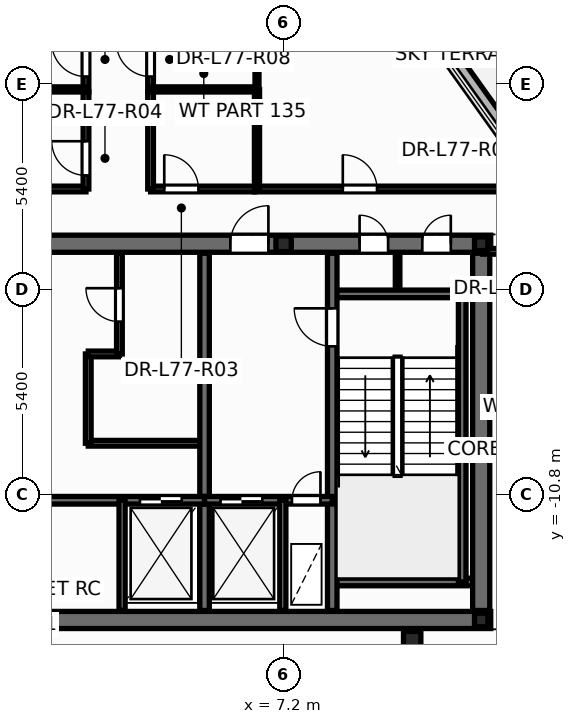
"""IFC4 building model, lengths in metres.
Left out: names, types, materials, properties, quantities, classifications, styles, units other than length and angle.
Written with IfcOpenShell. Run it as: python <this file> out.ifc"""

import sys

from ifc_helpers import new_model, si_unit, direction, frame, frame_2d, origin, origin_2d, place, context, subcontext, project, spatial, rectangle, hollow_circle, i_section, extrude, element, fill, save


model = new_model("IFC4")
c1 = context("Model", 3, precision=1e-05, world=origin(), true_north=direction((0.0, 1.0)))
c2 = subcontext(c1, "Body", "Model", "MODEL_VIEW")
j1 = project(units=[si_unit("LENGTHUNIT", "METRE"), si_unit("PLANEANGLEUNIT", "RADIAN")], contexts=[c1])
p1 = place(None, origin())
s1 = spatial("IfcSite", under=j1, at=p1, CompositionType="ELEMENT")
p2 = place(p1, origin())
s2 = spatial("IfcBuilding", under=s1, at=p2, CompositionType="ELEMENT")
p3 = place(p2, frame((0.0, 0.0, 293.4)))
s3 = spatial("IfcBuildingStorey", under=s2, at=p3, CompositionType="ELEMENT", Elevation=293.4)
p4 = place(p3, frame((10.583, -14.63, 0.0), z_axis=(0.0, 0.0, 1.0), x_axis=(1.0, 0.0, 0.0)))
e1 = element("IfcColumn", 1, at=p4, inside=s3, PredefinedType="COLUMN", context=c2, shape_type="SweptSolid", body=[
    extrude(hollow_circle(Radius=0.229, WallThickness=0.016, at=origin_2d()), origin(), (0.0, 0.0, 1.0), 4.2),
])
for number, where, z_axis, x_axis in (
    (2, (12.4, -14.1, 0.0), (0.0, 0.0, 1.0), (1.0, 0.0, 0.0)),
    (3, (12.4, -4.2, 0.0), (0.0, 0.0, 1.0), (1.0, 0.0, 0.0)),
):
    element("IfcColumn", number, at=place(p3, frame(where, z_axis=z_axis, x_axis=x_axis)), inside=s3, PredefinedType="COLUMN", context=c2, shape_type="SweptSolid", body=[
        extrude(i_section(OverallWidth=0.352, OverallDepth=0.359, WebThickness=0.018, FlangeThickness=0.026, at=origin_2d()), origin(), (0.0, 0.0, 1.0), 4.2),
    ])
p5 = place(p3, frame((7.2, -4.2, 0.0), z_axis=(0.0, 0.0, 1.0), x_axis=(1.0, 0.0, 0.0)))
e4 = element("IfcColumn", 4, at=p5, inside=s3, PredefinedType="PILASTER", context=c2, shape_type="SweptSolid", body=[
    extrude(i_section(OverallWidth=0.405, OverallDepth=0.414, WebThickness=0.022, FlangeThickness=0.032, at=origin_2d()), origin(), (0.0, 0.0, 1.0), 4.2),
])
p6 = place(p3, frame((15.285, -4.406, -0.2), z_axis=(0.0, 0.0, 1.0), x_axis=(-0.580762496963, 0.814073044709, 0.0)))
e5 = element("IfcWall", 5, at=p6, inside=s3, PredefinedType="PARAPET", context=c2, shape_type="SweptSolid", body=[
    extrude(rectangle(XDim=23.163, YDim=0.36, at=frame_2d((11.581, 0.0))), origin(), (0.0, 0.0, 1.0), 0.38),
])
p7 = place(p3, frame((2.06, -9.45, 0.0), z_axis=(0.0, 0.0, 1.0), x_axis=(1.0, 0.0, 0.0)))
e6 = element("IfcWall", 6, at=p7, inside=s3, PredefinedType="PARTITIONING", context=c2, shape_type="SweptSolid", body=[
    extrude(rectangle(XDim=3.06, YDim=0.15, at=frame_2d((1.53, 0.0))), origin(), (0.0, 0.0, 1.0), 3.88),
])
p8 = place(p3, frame((2.06, -9.45, 0.0), z_axis=(0.0, 0.0, 1.0), x_axis=(0.0, 1.0, 0.0)))
e7 = element("IfcWall", 7, at=p8, inside=s3, PredefinedType="PARTITIONING", context=c2, shape_type="SweptSolid", body=[
    extrude(rectangle(XDim=2.35, YDim=0.15, at=frame_2d((1.175, 0.0))), origin(), (0.0, 0.0, 1.0), 3.88),
])
p9 = place(p3, frame((2.06, -7.1, 0.0), z_axis=(0.0, 0.0, 1.0), x_axis=(1.0, 0.0, 0.0)))
e8 = element("IfcWall", 8, at=p9, inside=s3, PredefinedType="PARTITIONING", context=c2, shape_type="SweptSolid", body=[
    extrude(rectangle(XDim=0.82, YDim=0.15, at=frame_2d((0.41, 0.0))), origin(), (0.0, 0.0, 1.0), 3.88),
])
p10 = place(p3, frame((2.88, -7.1, 0.0), z_axis=(0.0, 0.0, 1.0), x_axis=(0.0, 1.0, 0.0)))
e9 = element("IfcWall", 9, at=p10, inside=s3, PredefinedType="PARTITIONING", context=c2, shape_type="SweptSolid", body=[
    extrude(rectangle(XDim=2.65, YDim=0.15, at=frame_2d((1.325, 0.0))), origin(), (0.0, 0.0, 1.0), 3.88),
])
p11 = place(p10, frame((0.85, 0.0, 0.0)))
e10 = element("IfcOpeningElement", 10, at=p11, cuts=e9, PredefinedType="OPENING", context=c2, shape_type="SweptSolid", body=[
    extrude(rectangle(XDim=0.886, YDim=2.104, at=frame_2d((0.44, 1.052))), frame((0.0, 0.085, 0.0), z_axis=(0.0, -1.0, 0.0), x_axis=(1.0, 0.0, 0.0)), (0.0, 0.0, 1.0), 0.17),
])
p12 = place(p3, frame((10.2, -5.52, 0.0), z_axis=(0.0, 0.0, 1.0), x_axis=(0.0, 1.0, 0.0)))
e11 = element("IfcWall", 11, at=p12, inside=s3, PredefinedType="PARTITIONING", context=c2, shape_type="SweptSolid", body=[
    extrude(rectangle(XDim=1.12, YDim=0.12, at=frame_2d((0.56, 0.0))), origin(), (0.0, 0.0, 1.0), 3.88),
])
p13 = place(p3, frame((-12.65, -14.1, 0.0), z_axis=(0.0, 0.0, 1.0), x_axis=(1.0, 0.0, 0.0)))
e12 = element("IfcWall", 12, at=p13, inside=s3, PredefinedType="SHEAR", context=c2, shape_type="SweptSolid", body=[
    extrude(rectangle(XDim=25.3, YDim=0.45, at=frame_2d((12.65, 0.0))), origin(), (0.0, 0.0, 1.0), 4.2),
])
p14 = place(p3, frame((-12.65, -4.2, 0.0), z_axis=(0.0, 0.0, 1.0), x_axis=(1.0, 0.0, 0.0)))
e13 = element("IfcWall", 13, at=p14, inside=s3, PredefinedType="SHEAR", context=c2, shape_type="SweptSolid", body=[
    extrude(rectangle(XDim=25.3, YDim=0.45, at=frame_2d((12.65, 0.0))), origin(), (0.0, 0.0, 1.0), 4.2),
])
p15 = place(p14, frame((0.95, 0.0, 0.0)))
e14 = element("IfcOpeningElement", 14, at=p15, cuts=e13, PredefinedType="OPENING", context=c2, shape_type="SweptSolid", body=[
    extrude(rectangle(XDim=0.756, YDim=2.054, at=frame_2d((0.375, 1.027))), frame((0.0, 0.235, 0.0), z_axis=(0.0, -1.0, 0.0), x_axis=(1.0, 0.0, 0.0)), (0.0, 0.0, 1.0), 0.47),
])
p16 = place(p14, frame((2.6, 0.0, 0.0)))
e15 = element("IfcOpeningElement", 15, at=p16, cuts=e13, PredefinedType="OPENING", context=c2, shape_type="SweptSolid", body=[
    extrude(rectangle(XDim=0.756, YDim=2.054, at=frame_2d((0.375, 1.027))), frame((0.0, 0.235, 0.0), z_axis=(0.0, -1.0, 0.0), x_axis=(1.0, 0.0, 0.0)), (0.0, 0.0, 1.0), 0.47),
])
p17 = place(p14, frame((21.85, 0.0, 0.0)))
e16 = element("IfcOpeningElement", 16, at=p17, cuts=e13, PredefinedType="OPENING", context=c2, shape_type="SweptSolid", body=[
    extrude(rectangle(XDim=0.756, YDim=2.054, at=frame_2d((0.375, 1.027))), frame((0.0, 0.235, 0.0), z_axis=(0.0, -1.0, 0.0), x_axis=(1.0, 0.0, 0.0)), (0.0, 0.0, 1.0), 0.47),
])
p18 = place(p14, frame((23.5, 0.0, 0.0)))
e17 = element("IfcOpeningElement", 17, at=p18, cuts=e13, PredefinedType="OPENING", context=c2, shape_type="SweptSolid", body=[
    extrude(rectangle(XDim=0.756, YDim=2.054, at=frame_2d((0.375, 1.027))), frame((0.0, 0.235, 0.0), z_axis=(0.0, -1.0, 0.0), x_axis=(1.0, 0.0, 0.0)), (0.0, 0.0, 1.0), 0.47),
])
p19 = place(p14, frame((5.85, 0.0, 0.0)))
e18 = element("IfcOpeningElement", 18, at=p19, cuts=e13, PredefinedType="OPENING", context=c2, shape_type="SweptSolid", body=[
    extrude(rectangle(XDim=1.006, YDim=2.104, at=frame_2d((0.5, 1.052))), frame((0.0, 0.235, 0.0), z_axis=(0.0, -1.0, 0.0), x_axis=(1.0, 0.0, 0.0)), (0.0, 0.0, 1.0), 0.47),
])
p20 = place(p14, frame((10.35, 0.0, 0.0)))
e19 = element("IfcOpeningElement", 19, at=p20, cuts=e13, PredefinedType="OPENING", context=c2, shape_type="SweptSolid", body=[
    extrude(rectangle(XDim=1.406, YDim=2.154, at=frame_2d((0.7, 1.077))), frame((0.0, 0.235, 0.0), z_axis=(0.0, -1.0, 0.0), x_axis=(1.0, 0.0, 0.0)), (0.0, 0.0, 1.0), 0.47),
])
p21 = place(p14, frame((18.45, 0.0, 0.0)))
e20 = element("IfcOpeningElement", 20, at=p21, cuts=e13, PredefinedType="OPENING", context=c2, shape_type="SweptSolid", body=[
    extrude(rectangle(XDim=1.006, YDim=2.104, at=frame_2d((0.5, 1.052))), frame((0.0, 0.235, 0.0), z_axis=(0.0, -1.0, 0.0), x_axis=(1.0, 0.0, 0.0)), (0.0, 0.0, 1.0), 0.47),
])
for number, where, z_axis, x_axis in (
    (21, (8.48, -5.52, 0.0), (0.0, 0.0, 1.0), (1.0, 0.0, 0.0)),
    (22, (8.48, -13.1, 0.0), (0.0, 0.0, 1.0), (1.0, 0.0, 0.0)),
):
    element("IfcWall", number, at=place(p3, frame(where, z_axis=z_axis, x_axis=x_axis)), inside=s3, PredefinedType="SOLIDWALL", context=c2, shape_type="SweptSolid", body=[
        extrude(rectangle(XDim=3.87, YDim=0.2, at=frame_2d((1.935, 0.0))), origin(), (0.0, 0.0, 1.0), 4.2),
    ])
p22 = place(p3, frame((11.9, -13.1, 0.0), z_axis=(0.0, 0.0, 1.0), x_axis=(0.0, 1.0, 0.0)))
e23 = element("IfcWall", 23, at=p22, inside=s3, PredefinedType="SOLIDWALL", context=c2, shape_type="SweptSolid", body=[
    extrude(rectangle(XDim=7.58, YDim=0.2, at=frame_2d((3.79, 0.0))), origin(), (0.0, 0.0, 1.0), 4.2),
])
p23 = place(p3, frame((8.48, -13.85, 0.0), z_axis=(0.0, 0.0, 1.0), x_axis=(0.0, 1.0, 0.0)))
e24 = element("IfcWall", 24, at=p23, inside=s3, PredefinedType="SHEAR", context=c2, shape_type="SweptSolid", body=[
    extrude(rectangle(XDim=9.4, YDim=0.25, at=frame_2d((4.7, 0.0))), origin(), (0.0, 0.0, 1.0), 4.2),
])
p24 = place(p23, frame((6.95, 0.0, 0.0)))
e25 = element("IfcOpeningElement", 25, at=p24, cuts=e24, PredefinedType="OPENING", context=c2, shape_type="SweptSolid", body=[
    extrude(rectangle(XDim=1.006, YDim=2.104, at=frame_2d((0.5, 1.052))), frame((0.0, 0.135, 0.0), z_axis=(0.0, -1.0, 0.0), x_axis=(1.0, 0.0, 0.0)), (0.0, 0.0, 1.0), 0.27),
])
p25 = place(p3, frame((5.12, -13.85, 0.0), z_axis=(0.0, 0.0, 1.0), x_axis=(0.0, 1.0, 0.0)))
e26 = element("IfcWall", 26, at=p25, inside=s3, PredefinedType="SHEAR", context=c2, shape_type="SweptSolid", body=[
    extrude(rectangle(XDim=9.4, YDim=0.25, at=frame_2d((4.7, 0.0))), origin(), (0.0, 0.0, 1.0), 4.2),
])
p26 = place(p3, frame((-5.12, -10.95, 0.0), z_axis=(0.0, 0.0, 1.0), x_axis=(1.0, 0.0, 0.0)))
e27 = element("IfcWall", 27, at=p26, inside=s3, PredefinedType="SOLIDWALL", context=c2, shape_type="SweptSolid", body=[
    extrude(rectangle(XDim=10.24, YDim=0.2, at=frame_2d((5.12, 0.0))), origin(), (0.0, 0.0, 1.0), 4.2),
])
p27 = place(p26, frame((0.6, 0.0, 0.0)))
e28 = element("IfcOpeningElement", 28, at=p27, cuts=e27, PredefinedType="OPENING", context=c2, shape_type="SweptSolid", body=[
    extrude(rectangle(XDim=1.106, YDim=2.104, at=frame_2d((0.55, 1.052))), frame((0.0, 0.11, 0.0), z_axis=(0.0, -1.0, 0.0), x_axis=(1.0, 0.0, 0.0)), (0.0, 0.0, 1.0), 0.22),
])
p28 = place(p26, frame((4.65, 0.0, 0.0)))
e29 = element("IfcOpeningElement", 29, at=p28, cuts=e27, PredefinedType="OPENING", context=c2, shape_type="SweptSolid", body=[
    extrude(rectangle(XDim=0.956, YDim=2.104, at=frame_2d((0.475, 1.052))), frame((0.0, 0.11, 0.0), z_axis=(0.0, -1.0, 0.0), x_axis=(1.0, 0.0, 0.0)), (0.0, 0.0, 1.0), 0.22),
])
p29 = place(p26, frame((8.54, 0.0, 0.0)))
e30 = element("IfcOpeningElement", 30, at=p29, cuts=e27, PredefinedType="OPENING", context=c2, shape_type="SweptSolid", body=[
    extrude(rectangle(XDim=1.106, YDim=2.104, at=frame_2d((0.55, 1.052))), frame((0.0, 0.11, 0.0), z_axis=(0.0, -1.0, 0.0), x_axis=(1.0, 0.0, 0.0)), (0.0, 0.0, 1.0), 0.22),
])
p30 = place(p3, frame((5.12, -10.95, 0.0), z_axis=(0.0, 0.0, 1.0), x_axis=(1.0, 0.0, 0.0)))
e31 = element("IfcWall", 31, at=p30, inside=s3, PredefinedType="SOLIDWALL", context=c2, shape_type="SweptSolid", body=[
    extrude(rectangle(XDim=3.36, YDim=0.2, at=frame_2d((1.68, 0.0))), origin(), (0.0, 0.0, 1.0), 4.2),
])
p31 = place(p30, frame((0.42, 0.0, 0.0)))
e32 = element("IfcOpeningElement", 32, at=p31, cuts=e31, PredefinedType="OPENING", context=c2, shape_type="SweptSolid", body=[
    extrude(rectangle(XDim=1.106, YDim=2.104, at=frame_2d((0.55, 1.052))), frame((0.0, 0.11, 0.0), z_axis=(0.0, -1.0, 0.0), x_axis=(1.0, 0.0, 0.0)), (0.0, 0.0, 1.0), 0.22),
])
p32 = place(p30, frame((2.3, 0.0, 0.0)))
e33 = element("IfcOpeningElement", 33, at=p32, cuts=e31, PredefinedType="OPENING", context=c2, shape_type="SweptSolid", body=[
    extrude(rectangle(XDim=0.756, YDim=2.054, at=frame_2d((0.375, 1.027))), frame((0.0, 0.11, 0.0), z_axis=(0.0, -1.0, 0.0), x_axis=(1.0, 0.0, 0.0)), (0.0, 0.0, 1.0), 0.22),
])
for number, where, z_axis, x_axis in (
    (34, (7.18, -13.85, 0.0), (0.0, 0.0, 1.0), (0.0, 1.0, 0.0)),
    (35, (2.95, -13.85, 0.0), (0.0, 0.0, 1.0), (0.0, 1.0, 0.0)),
):
    element("IfcWall", number, at=place(p3, frame(where, z_axis=z_axis, x_axis=x_axis)), inside=s3, PredefinedType="PARTITIONING", context=c2, shape_type="SweptSolid", body=[
        extrude(rectangle(XDim=2.9, YDim=0.16, at=frame_2d((1.45, 0.0))), origin(), (0.0, 0.0, 1.0), 3.105),
    ])
p33 = place(p3, frame((12.4, -13.85, 0.0), z_axis=(0.0, 0.0, 1.0), x_axis=(0.0, 1.0, 0.0)))
e36 = element("IfcWall", 36, at=p33, inside=s3, PredefinedType="SHEAR", context=c2, shape_type="SweptSolid", body=[
    extrude(rectangle(XDim=9.4, YDim=0.45, at=frame_2d((4.7, 0.0))), origin(), (0.0, 0.0, 1.0), 4.2),
])
p34 = place(p3, frame((6.44, -2.76, 0.0), z_axis=(0.0, 0.0, 1.0), x_axis=(1.0, 0.0, 0.0)))
e37 = element("IfcWall", 37, at=p34, inside=s3, PredefinedType="PARTITIONING", context=c2, shape_type="SweptSolid", body=[
    extrude(rectangle(XDim=7.474, YDim=0.15, at=frame_2d((3.737, 0.0))), origin(), (0.0, 0.0, 1.0), 2.855),
])
p35 = place(p34, frame((2.318, 0.0, 0.0)))
e38 = element("IfcOpeningElement", 38, at=p35, cuts=e37, PredefinedType="OPENING", context=c2, shape_type="SweptSolid", body=[
    extrude(rectangle(XDim=0.906, YDim=2.104, at=frame_2d((0.45, 1.052))), frame((0.0, 0.085, 0.0), z_axis=(0.0, -1.0, 0.0), x_axis=(1.0, 0.0, 0.0)), (0.0, 0.0, 1.0), 0.17),
])
p36 = place(p3, frame((2.0, -0.2, 0.0), z_axis=(0.0, 0.0, 1.0), x_axis=(0.0, 1.0, 0.0)))
e39 = element("IfcWall", 39, at=p36, inside=s3, PredefinedType="PARTITIONING", context=c2, shape_type="SweptSolid", body=[
    extrude(rectangle(XDim=4.36, YDim=0.15, at=frame_2d((2.18, 0.0))), origin(), (0.0, 0.0, 1.0), 3.88),
])
p37 = place(p36, frame((0.398, 0.0, 0.0)))
e40 = element("IfcOpeningElement", 40, at=p37, cuts=e39, PredefinedType="OPENING", context=c2, shape_type="SweptSolid", body=[
    extrude(rectangle(XDim=0.906, YDim=2.104, at=frame_2d((0.45, 1.052))), frame((0.0, 0.085, 0.0), z_axis=(0.0, -1.0, 0.0), x_axis=(1.0, 0.0, 0.0)), (0.0, 0.0, 1.0), 0.17),
])
p38 = place(p3, frame((3.7, -0.2, 0.0), z_axis=(0.0, 0.0, 1.0), x_axis=(0.0, 1.0, 0.0)))
e41 = element("IfcWall", 41, at=p38, inside=s3, PredefinedType="PARTITIONING", context=c2, shape_type="SweptSolid", body=[
    extrude(rectangle(XDim=4.36, YDim=0.15, at=frame_2d((2.18, 0.0))), origin(), (0.0, 0.0, 1.0), 2.855),
])
p39 = place(p38, frame((0.398, 0.0, 0.0)))
e42 = element("IfcOpeningElement", 42, at=p39, cuts=e41, PredefinedType="OPENING", context=c2, shape_type="SweptSolid", body=[
    extrude(rectangle(XDim=0.906, YDim=2.104, at=frame_2d((0.45, 1.052))), frame((0.0, 0.085, 0.0), z_axis=(0.0, -1.0, 0.0), x_axis=(1.0, 0.0, 0.0)), (0.0, 0.0, 1.0), 0.17),
])
p40 = place(p3, frame((6.5, -0.2, 0.0), z_axis=(0.0, 0.0, 1.0), x_axis=(0.0, 1.0, 0.0)))
e43 = element("IfcWall", 43, at=p40, inside=s3, PredefinedType="PARTITIONING", context=c2, shape_type="SweptSolid", body=[
    extrude(rectangle(XDim=4.3, YDim=0.105, at=frame_2d((2.15, 0.0))), origin(), (0.0, 0.0, 1.0), 2.855),
])
p41 = place(p3, frame((-0.738, -2.76, 0.0), z_axis=(0.0, 0.0, 1.0), x_axis=(1.0, 0.0, 0.0)))
e44 = element("IfcWall", 44, at=p41, inside=s3, PredefinedType="PARTITIONING", context=c2, shape_type="SweptSolid", body=[
    extrude(rectangle(XDim=2.738, YDim=0.15, at=frame_2d((1.369, 0.0))), origin(), (0.0, 0.0, 1.0), 2.855),
])
p42 = place(p3, frame((3.7, -2.76, 0.0), z_axis=(0.0, 0.0, 1.0), x_axis=(1.0, 0.0, 0.0)))
e45 = element("IfcWall", 45, at=p42, inside=s3, PredefinedType="PARTITIONING", context=c2, shape_type="SweptSolid", body=[
    extrude(rectangle(XDim=2.738, YDim=0.15, at=frame_2d((1.369, 0.0))), origin(), (0.0, 0.0, 1.0), 3.88),
])
p43 = place(p42, frame((0.36, 0.0, 0.0)))
e46 = element("IfcOpeningElement", 46, at=p43, cuts=e45, PredefinedType="OPENING", context=c2, shape_type="SweptSolid", body=[
    extrude(rectangle(XDim=0.906, YDim=2.104, at=frame_2d((0.45, 1.052))), frame((0.0, 0.085, 0.0), z_axis=(0.0, -1.0, 0.0), x_axis=(1.0, 0.0, 0.0)), (0.0, 0.0, 1.0), 0.17),
])
for number, where, z_axis, x_axis in (
    (47, (3.7, -0.14, 0.0), (0.0, 0.0, 1.0), (1.0, 0.0, 0.0)),
    (48, (-0.8, -0.14, 0.0), (0.0, 0.0, 1.0), (1.0, 0.0, 0.0)),
):
    element("IfcWall", number, at=place(p3, frame(where, z_axis=z_axis, x_axis=x_axis)), inside=s3, PredefinedType="PARTITIONING", context=c2, shape_type="SweptSolid", body=[
        extrude(rectangle(XDim=2.8, YDim=0.135, at=frame_2d((1.4, 0.0))), origin(), (0.0, 0.0, 1.0), 2.855),
    ])
p44 = place(p3, frame((3.7, -2.76, 0.0), z_axis=(0.0, 0.0, 1.0), x_axis=(0.0, 1.0, 0.0)))
e49 = element("IfcWall", 49, at=p44, inside=s3, PredefinedType="PARTITIONING", context=c2, shape_type="SweptSolid", body=[
    extrude(rectangle(XDim=2.558, YDim=0.15, at=frame_2d((1.279, 0.0))), origin(), (0.0, 0.0, 1.0), 2.855),
])
p45 = place(p3, frame((2.0, -2.76, 0.0), z_axis=(0.0, 0.0, 1.0), x_axis=(0.0, 1.0, 0.0)))
e50 = element("IfcWall", 50, at=p45, inside=s3, PredefinedType="PARTITIONING", context=c2, shape_type="SweptSolid", body=[
    extrude(rectangle(XDim=2.558, YDim=0.15, at=frame_2d((1.279, 0.0))), origin(), (0.0, 0.0, 1.0), 2.855),
])
p46 = place(p45, frame((0.357, 0.0, 0.0)))
e51 = element("IfcOpeningElement", 51, at=p46, cuts=e50, PredefinedType="OPENING", context=c2, shape_type="SweptSolid", body=[
    extrude(rectangle(XDim=0.906, YDim=2.104, at=frame_2d((0.45, 1.052))), frame((0.0, 0.085, 0.0), z_axis=(0.0, -1.0, 0.0), x_axis=(1.0, 0.0, 0.0)), (0.0, 0.0, 1.0), 0.17),
])
p47 = place(p3, frame((12.44, -4.4, 0.0), z_axis=(0.0, 0.0, 1.0), x_axis=(1.0, 0.0, 0.0)))
e52 = element("IfcWall", 52, at=p47, inside=s3, PredefinedType="PARTITIONING", context=c2, shape_type="SweptSolid", body=[
    extrude(rectangle(XDim=2.644, YDim=0.15, at=frame_2d((1.322, 0.0))), origin(), (0.0, 0.0, 1.0), 2.855),
])
p48 = place(p47, frame((1.644, 0.0, 0.0)))
e53 = element("IfcOpeningElement", 53, at=p48, cuts=e52, PredefinedType="OPENING", context=c2, shape_type="SweptSolid", body=[
    extrude(rectangle(XDim=0.906, YDim=2.104, at=frame_2d((0.45, 1.052))), frame((0.0, 0.085, 0.0), z_axis=(0.0, -1.0, 0.0), x_axis=(1.0, 0.0, 0.0)), (0.0, 0.0, 1.0), 0.17),
])
p49 = place(p3, frame((6.5, -2.76, 0.0), z_axis=(0.0, 0.0, 1.0), x_axis=(0.0, 1.0, 0.0)))
e54 = element("IfcWall", 54, at=p49, inside=s3, PredefinedType="PARTITIONING", context=c2, shape_type="SweptSolid", body=[
    extrude(rectangle(XDim=2.62, YDim=0.135, at=frame_2d((1.31, 0.0))), origin(), (0.0, 0.0, 1.0), 2.855),
])
p50 = place(p11, origin())
e55 = element("IfcDoor", 55, at=p50, inside=s3, OperationType="SINGLE_SWING_RIGHT", PredefinedType="DOOR", context=c2, shape_type="SweptSolid", body=[
    extrude(rectangle(XDim=0.88, YDim=2.1, at=frame_2d((0.44, 1.05))), frame((0.0, 0.025, 0.0), z_axis=(0.0, -1.0, 0.0), x_axis=(1.0, 0.0, 0.0)), (0.0, 0.0, 1.0), 0.05),
])
fill(e10, e55)
p51 = place(p24, origin())
e56 = element("IfcDoor", 56, at=p51, inside=s3, OperationType="SINGLE_SWING_RIGHT", PredefinedType="DOOR", context=c2, shape_type="SweptSolid", body=[
    extrude(rectangle(XDim=1.0, YDim=2.1, at=frame_2d((0.5, 1.05))), frame((0.0, 0.025, 0.0), z_axis=(0.0, -1.0, 0.0), x_axis=(1.0, 0.0, 0.0)), (0.0, 0.0, 1.0), 0.05),
])
fill(e25, e56)
p52 = place(p31, origin())
e57 = element("IfcDoor", 57, at=p52, inside=s3, OperationType="DOUBLE_DOOR_SLIDING", PredefinedType="DOOR", context=c2, shape_type="SweptSolid", body=[
    extrude(rectangle(XDim=1.1, YDim=2.1, at=frame_2d((0.55, 1.05))), frame((0.0, 0.025, 0.0), z_axis=(0.0, -1.0, 0.0), x_axis=(1.0, 0.0, 0.0)), (0.0, 0.0, 1.0), 0.05),
])
fill(e32, e57)
p53 = place(p32, origin())
e58 = element("IfcDoor", 58, at=p53, inside=s3, OperationType="SINGLE_SWING_RIGHT", PredefinedType="DOOR", context=c2, shape_type="SweptSolid", body=[
    extrude(rectangle(XDim=0.75, YDim=2.05, at=frame_2d((0.375, 1.025))), frame((0.0, 0.025, 0.0), z_axis=(0.0, -1.0, 0.0), x_axis=(1.0, 0.0, 0.0)), (0.0, 0.0, 1.0), 0.05),
])
fill(e33, e58)
p54 = place(p29, origin())
e59 = element("IfcDoor", 59, at=p54, inside=s3, OperationType="DOUBLE_DOOR_SLIDING", PredefinedType="DOOR", context=c2, shape_type="SweptSolid", body=[
    extrude(rectangle(XDim=1.1, YDim=2.1, at=frame_2d((0.55, 1.05))), frame((0.0, 0.025, 0.0), z_axis=(0.0, -1.0, 0.0), x_axis=(1.0, 0.0, 0.0)), (0.0, 0.0, 1.0), 0.05),
])
fill(e30, e59)
p55 = place(p17, origin())
e60 = element("IfcDoor", 60, at=p55, inside=s3, OperationType="SINGLE_SWING_LEFT", PredefinedType="DOOR", context=c2, shape_type="SweptSolid", body=[
    extrude(rectangle(XDim=0.75, YDim=2.05, at=frame_2d((0.375, 1.025))), frame((0.0, 0.025, 0.0), z_axis=(0.0, -1.0, 0.0), x_axis=(1.0, 0.0, 0.0)), (0.0, 0.0, 1.0), 0.05),
])
fill(e16, e60)
p56 = place(p18, origin())
e61 = element("IfcDoor", 61, at=p56, inside=s3, OperationType="SINGLE_SWING_RIGHT", PredefinedType="DOOR", context=c2, shape_type="SweptSolid", body=[
    extrude(rectangle(XDim=0.75, YDim=2.05, at=frame_2d((0.375, 1.025))), frame((0.0, 0.025, 0.0), z_axis=(0.0, -1.0, 0.0), x_axis=(1.0, 0.0, 0.0)), (0.0, 0.0, 1.0), 0.05),
])
fill(e17, e61)
p57 = place(p21, origin())
e62 = element("IfcDoor", 62, at=p57, inside=s3, OperationType="SINGLE_SWING_RIGHT", PredefinedType="DOOR", context=c2, shape_type="SweptSolid", body=[
    extrude(rectangle(XDim=1.0, YDim=2.1, at=frame_2d((0.5, 1.05))), frame((0.0, 0.025, 0.0), z_axis=(0.0, -1.0, 0.0), x_axis=(1.0, 0.0, 0.0)), (0.0, 0.0, 1.0), 0.05),
])
fill(e20, e62)
p58 = place(p43, origin())
e63 = element("IfcDoor", 63, at=p58, inside=s3, OperationType="SINGLE_SWING_LEFT", PredefinedType="DOOR", context=c2, shape_type="SweptSolid", body=[
    extrude(rectangle(XDim=0.9, YDim=2.1, at=frame_2d((0.45, 1.05))), frame((0.0, 0.025, 0.0), z_axis=(0.0, -1.0, 0.0), x_axis=(1.0, 0.0, 0.0)), (0.0, 0.0, 1.0), 0.05),
])
fill(e46, e63)
p59 = place(p46, origin())
e64 = element("IfcDoor", 64, at=p59, inside=s3, OperationType="SINGLE_SWING_RIGHT", PredefinedType="DOOR", context=c2, shape_type="SweptSolid", body=[
    extrude(rectangle(XDim=0.9, YDim=2.1, at=frame_2d((0.45, 1.05))), frame((0.0, 0.025, 0.0), z_axis=(0.0, -1.0, 0.0), x_axis=(1.0, 0.0, 0.0)), (0.0, 0.0, 1.0), 0.05),
])
fill(e51, e64)
p60 = place(p37, origin())
e65 = element("IfcDoor", 65, at=p60, inside=s3, OperationType="SINGLE_SWING_RIGHT", PredefinedType="DOOR", context=c2, shape_type="SweptSolid", body=[
    extrude(rectangle(XDim=0.9, YDim=2.1, at=frame_2d((0.45, 1.05))), frame((0.0, 0.025, 0.0), z_axis=(0.0, -1.0, 0.0), x_axis=(1.0, 0.0, 0.0)), (0.0, 0.0, 1.0), 0.05),
])
fill(e40, e65)
p61 = place(p35, origin())
e66 = element("IfcDoor", 66, at=p61, inside=s3, OperationType="SINGLE_SWING_LEFT", PredefinedType="DOOR", context=c2, shape_type="SweptSolid", body=[
    extrude(rectangle(XDim=0.9, YDim=2.1, at=frame_2d((0.45, 1.05))), frame((0.0, 0.025, 0.0), z_axis=(0.0, -1.0, 0.0), x_axis=(1.0, 0.0, 0.0)), (0.0, 0.0, 1.0), 0.05),
])
fill(e38, e66)
p62 = place(p39, origin())
e67 = element("IfcDoor", 67, at=p62, inside=s3, OperationType="SINGLE_SWING_RIGHT", PredefinedType="DOOR", context=c2, shape_type="SweptSolid", body=[
    extrude(rectangle(XDim=0.9, YDim=2.1, at=frame_2d((0.45, 1.05))), frame((0.0, 0.025, 0.0), z_axis=(0.0, -1.0, 0.0), x_axis=(1.0, 0.0, 0.0)), (0.0, 0.0, 1.0), 0.05),
])
fill(e42, e67)
save(model, sys.argv[1])
